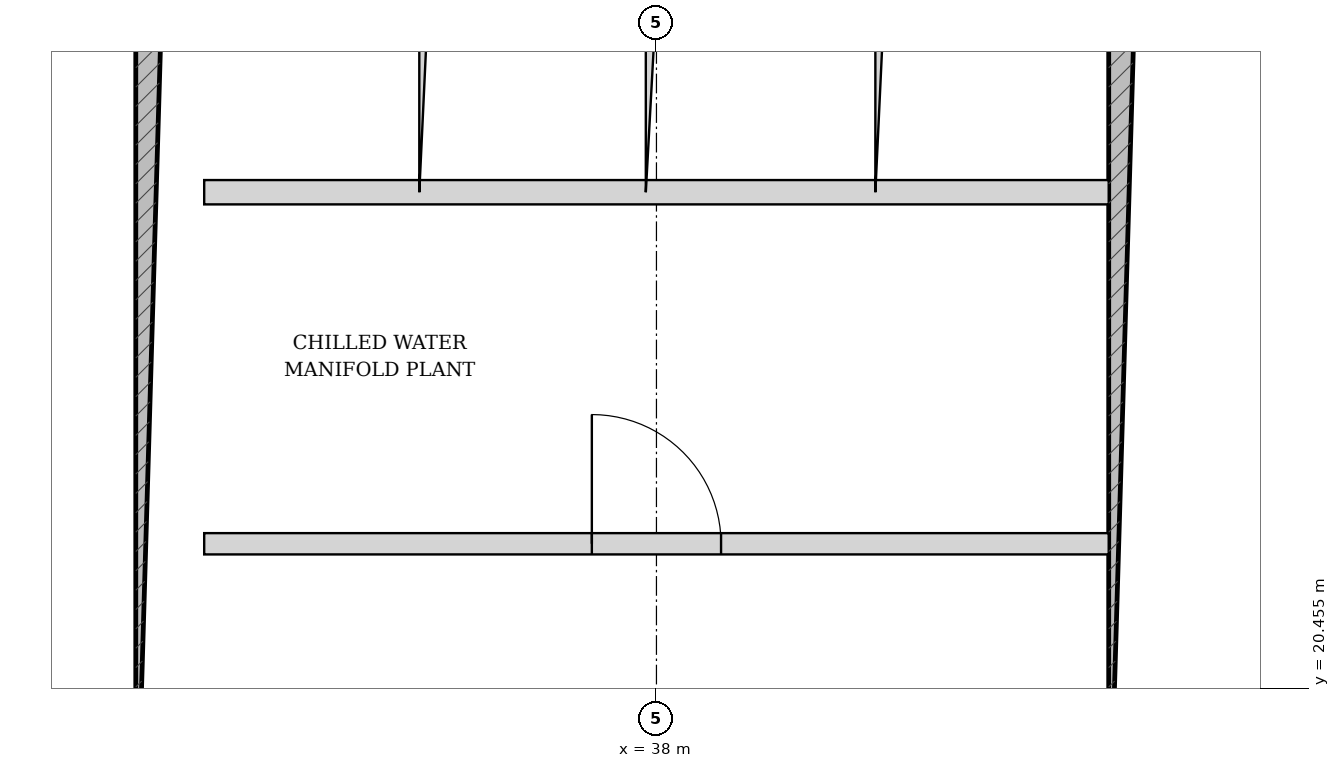
"""IFC4 building model, lengths in metres.
Left out: names, types, materials, properties, quantities, classifications, styles, units other than length and angle.
Written with IfcOpenShell. Run it as: python <this file> out.ifc"""

import sys

from ifc_helpers import new_model, si_unit, direction, frame, frame_2d, origin, place, context, subcontext, project, spatial, rectangle, extrude, source, transform, mapped, element, fill, save


model = new_model("IFC4")
c1 = context("Model", 3, precision=1e-05, world=origin(), true_north=direction((-0.2419218956, 0.970295726276)))
c2 = subcontext(c1, "Body", "Model", "MODEL_VIEW")
j1 = project(units=[si_unit("LENGTHUNIT", "METRE"), si_unit("PLANEANGLEUNIT", "RADIAN")], contexts=[c1])
p1 = place(None, origin())
s1 = spatial("IfcSite", under=j1, at=p1, CompositionType="ELEMENT")
p2 = place(p1, origin())
s2 = spatial("IfcBuilding", under=s1, at=p2, CompositionType="ELEMENT")
p3 = place(p2, frame((0.0, 0.0, 56.4)))
s3 = spatial("IfcBuildingStorey", under=s2, at=p3, CompositionType="ELEMENT", Elevation=56.4)
p4 = place(p3, frame((34.8, 19.175, 0.0), z_axis=(0.0, 0.0, 1.0), x_axis=(0.0, 1.0, 0.0)))
e1 = element("IfcWall", 1, at=p4, inside=s3, PredefinedType="SHEAR", context=c2, shape_type="SweptSolid", body=[
    extrude(rectangle(XDim=15.25, YDim=0.45, at=frame_2d((7.625, 0.0))), origin(), (0.0, 0.0, 1.0), 3.32),
])
p5 = place(p4, frame((7.8, 0.0, 0.0)))
e2 = element("IfcOpeningElement", 2, at=p5, cuts=e1, PredefinedType="OPENING", context=c2, shape_type="SweptSolid", body=[
    extrude(rectangle(XDim=1.05, YDim=2.15, at=frame_2d((0.525, 1.075))), frame((0.0, 0.235, 0.0), z_axis=(0.0, -1.0, 0.0), x_axis=(1.0, 0.0, 0.0)), (0.0, 0.0, 1.0), 0.47),
])
p6 = place(p3, frame((41.2, 19.175, 0.0), z_axis=(0.0, 0.0, 1.0), x_axis=(0.0, 1.0, 0.0)))
e3 = element("IfcWall", 3, at=p6, inside=s3, PredefinedType="SHEAR", context=c2, shape_type="SweptSolid", body=[
    extrude(rectangle(XDim=15.25, YDim=0.45, at=frame_2d((7.625, 0.0))), origin(), (0.0, 0.0, 1.0), 3.32),
])
p7 = place(p6, frame((7.8, 0.0, 0.0)))
e4 = element("IfcOpeningElement", 4, at=p7, cuts=e3, PredefinedType="OPENING", context=c2, shape_type="SweptSolid", body=[
    extrude(rectangle(XDim=1.05, YDim=2.15, at=frame_2d((0.525, 1.075))), frame((0.0, 0.235, 0.0), z_axis=(0.0, -1.0, 0.0), x_axis=(1.0, 0.0, 0.0)), (0.0, 0.0, 1.0), 0.47),
])
p8 = place(p3, frame((35.025, 23.72, 0.0), z_axis=(0.0, 0.0, 1.0), x_axis=(1.0, 0.0, 0.0)))
e5 = element("IfcWall", 5, at=p8, inside=s3, PredefinedType="PARTITIONING", context=c2, shape_type="SweptSolid", body=[
    extrude(rectangle(XDim=5.95, YDim=0.16, at=frame_2d((2.975, 0.0))), origin(), (0.0, 0.0, 1.0), 3.32),
])
p9 = place(p3, frame((36.5, 23.72, 0.0), z_axis=(0.0, 0.0, 1.0), x_axis=(0.0, 1.0, 0.0)))
e6 = element("IfcWall", 6, at=p9, inside=s3, PredefinedType="PARTITIONING", context=c2, shape_type="SweptSolid", body=[
    extrude(rectangle(XDim=2.56, YDim=0.12, at=frame_2d((1.28, 0.0))), origin(), (0.0, 0.0, 1.0), 3.32),
])
p10 = place(p3, frame((38.0, 23.72, 0.0), z_axis=(0.0, 0.0, 1.0), x_axis=(0.0, 1.0, 0.0)))
e7 = element("IfcWall", 7, at=p10, inside=s3, PredefinedType="PARTITIONING", context=c2, shape_type="SweptSolid", body=[
    extrude(rectangle(XDim=2.56, YDim=0.14, at=frame_2d((1.28, 0.0))), origin(), (0.0, 0.0, 1.0), 3.32),
])
p11 = place(p3, frame((39.5, 23.72, 0.0), z_axis=(0.0, 0.0, 1.0), x_axis=(0.0, 1.0, 0.0)))
e8 = element("IfcWall", 8, at=p11, inside=s3, PredefinedType="PARTITIONING", context=c2, shape_type="SweptSolid", body=[
    extrude(rectangle(XDim=2.56, YDim=0.12, at=frame_2d((1.28, 0.0))), origin(), (0.0, 0.0, 1.0), 3.32),
])
p12 = place(p3, frame((35.025, 21.407, 0.0), z_axis=(0.0, 0.0, 1.0), x_axis=(1.0, 0.0, 0.0)))
e9 = element("IfcWall", 9, at=p12, inside=s3, PredefinedType="PARTITIONING", context=c2, shape_type="SweptSolid", body=[
    extrude(rectangle(XDim=5.95, YDim=0.14, at=frame_2d((2.975, 0.0))), origin(), (0.0, 0.0, 1.0), 3.32),
])
p13 = place(p12, frame((2.55, 0.0, 0.0)))
e10 = element("IfcOpeningElement", 10, at=p13, cuts=e9, PredefinedType="OPENING", context=c2, shape_type="SweptSolid", body=[
    extrude(rectangle(XDim=0.85, YDim=2.1, at=frame_2d((0.425, 1.05))), frame((0.0, 0.08, 0.0), z_axis=(0.0, -1.0, 0.0), x_axis=(1.0, 0.0, 0.0)), (0.0, 0.0, 1.0), 0.16),
])
m1 = source(origin(), c2, "Body", "SweptSolid", [
    extrude(rectangle(XDim=0.85, YDim=2.1, at=frame_2d((0.425, 1.05))), frame((0.0, 0.025, 0.0), z_axis=(0.0, -1.0, 0.0), x_axis=(1.0, 0.0, 0.0)), (0.0, 0.0, 1.0), 0.05),
])
p14 = place(p13, origin())
e11 = element("IfcDoor", 11, at=p14, inside=s3, OperationType="SINGLE_SWING_LEFT", PredefinedType="DOOR", context=c2, shape_type="MappedRepresentation", body=[
    mapped(m1, transform((0.0, 0.0, 0.0), scale=1.0)),
])
fill(e10, e11)
save(model, sys.argv[1])
